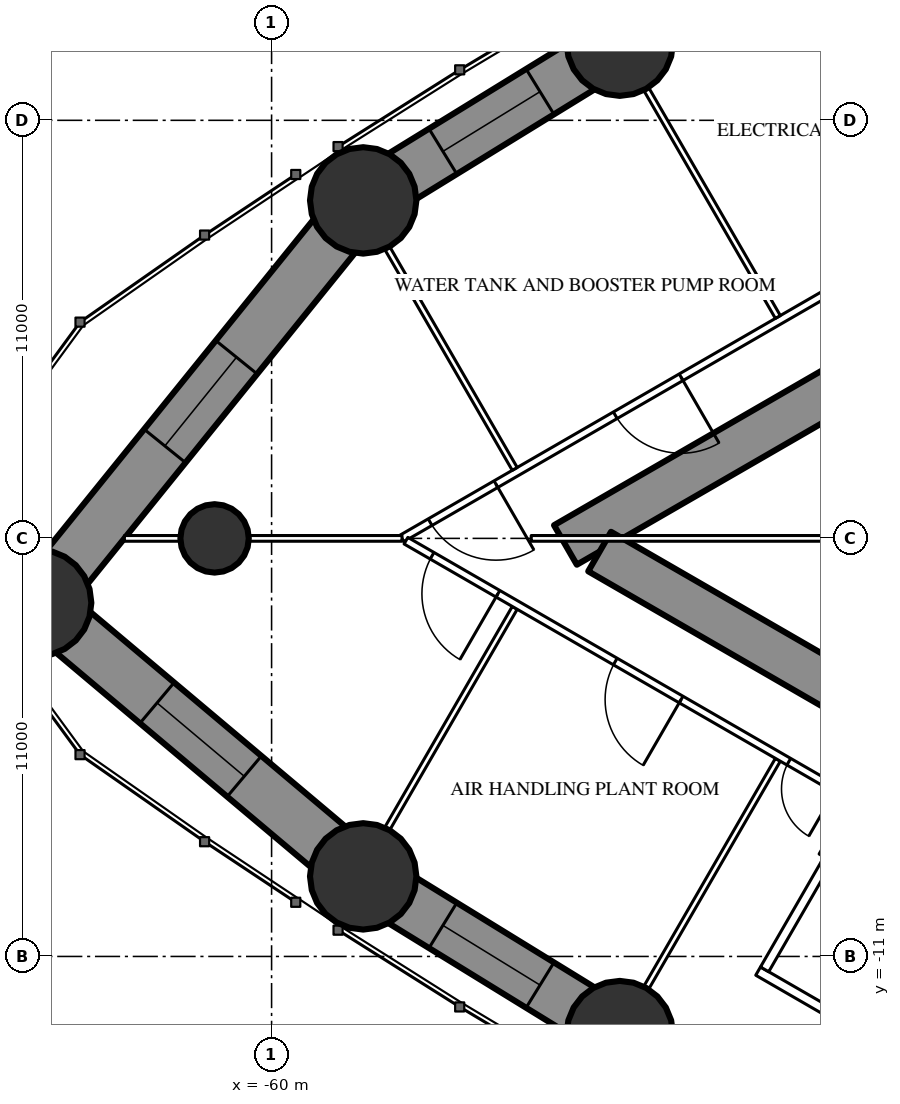
"""IFC4 building model, lengths in metres.
Left out: names, types, materials, properties, quantities, classifications, styles, units other than length and angle.
Written with IfcOpenShell. Run it as: python <this file> out.ifc"""

import sys

from ifc_helpers import new_model, si_unit, direction, frame, frame_2d, origin, origin_2d, place, context, subcontext, project, spatial, rectangle, circle, extrude, element, fill, save


model = new_model("IFC4")
c1 = context("Model", 3, precision=1e-05, world=origin(), true_north=direction((0.0, 1.0)))
c2 = subcontext(c1, "Body", "Model", "MODEL_VIEW")
j1 = project(units=[si_unit("LENGTHUNIT", "METRE"), si_unit("PLANEANGLEUNIT", "RADIAN")], contexts=[c1])
p1 = place(None, origin())
s1 = spatial("IfcSite", under=j1, at=p1, CompositionType="ELEMENT")
p2 = place(p1, origin())
s2 = spatial("IfcBuilding", under=s1, at=p2, CompositionType="ELEMENT")
p3 = place(p2, frame((0.0, 0.0, 201.8)))
s3 = spatial("IfcBuildingStorey", under=s2, at=p3, CompositionType="ELEMENT", Elevation=201.8)
for number, where, z_axis, x_axis in (
    (1, (-66.143, -1.695, 0.0), (0.0, 0.0, 1.0), (1.0, 0.0, 0.0)),
    (2, (-57.59, -8.893, 0.0), (0.0, 0.0, 1.0), (1.0, 0.0, 0.0)),
    (3, (-50.839, -13.043, 0.0), (0.0, 0.0, 1.0), (1.0, 0.0, 0.0)),
    (4, (-50.839, 13.043, 0.0), (0.0, 0.0, 1.0), (1.0, 0.0, 0.0)),
    (5, (-57.59, 8.893, 0.0), (0.0, 0.0, 1.0), (1.0, 0.0, 0.0)),
):
    element("IfcColumn", number, at=place(p3, frame(where, z_axis=z_axis, x_axis=x_axis)), inside=s3, PredefinedType="COLUMN", context=c2, shape_type="SweptSolid", body=[
        extrude(circle(Radius=1.4, at=origin_2d()), origin(), (0.0, 0.0, 1.0), 3.5),
    ])
p4 = place(p3, frame((-61.5, 0.0, 0.0), z_axis=(0.0, 0.0, 1.0), x_axis=(1.0, 0.0, 0.0)))
e6 = element("IfcColumn", 6, at=p4, inside=s3, PredefinedType="COLUMN", context=c2, shape_type="SweptSolid", body=[
    extrude(circle(Radius=0.9, at=origin_2d()), origin(), (0.0, 0.0, 1.0), 3.5),
])
p5 = place(p3, frame((-27.2, 14.3, 0.0), z_axis=(0.0, 0.0, 1.0), x_axis=(-0.866026593062, -0.499997940104, 0.0)))
e7 = element("IfcWall", 7, at=p5, inside=s3, PredefinedType="SHEAR", context=c2, shape_type="SweptSolid", body=[
    extrude(rectangle(XDim=28.946, YDim=1.2, at=frame_2d((14.473, 0.0))), origin(), (0.0, 0.0, 1.0), 3.5),
])
p6 = place(p5, frame((6.5, 0.0, 0.0)))
e8 = element("IfcOpeningElement", 8, at=p6, cuts=e7, PredefinedType="OPENING", context=c2, shape_type="SweptSolid", body=[
    extrude(rectangle(XDim=1.0, YDim=2.2, at=frame_2d((0.5, 1.1))), frame((0.0, 0.61, 0.0), z_axis=(0.0, -1.0, 0.0), x_axis=(1.0, 0.0, 0.0)), (0.0, 0.0, 1.0), 1.22),
])
p7 = place(p5, frame((13.395, 0.0, 0.0)))
e9 = element("IfcOpeningElement", 9, at=p7, cuts=e7, PredefinedType="OPENING", context=c2, shape_type="SweptSolid", body=[
    extrude(rectangle(XDim=1.8, YDim=2.03, at=frame_2d((0.9, 1.015))), frame((0.0, 0.61, 0.0), z_axis=(0.0, -1.0, 0.0), x_axis=(1.0, 0.0, 0.0)), (0.0, 0.0, 1.0), 1.22),
])
p8 = place(p3, frame((-27.2, -14.3, 0.0), z_axis=(0.0, 0.0, 1.0), x_axis=(-0.866024021859, 0.500002393557, 0.0)))
e10 = element("IfcWall", 10, at=p8, inside=s3, PredefinedType="SHEAR", context=c2, shape_type="SweptSolid", body=[
    extrude(rectangle(XDim=27.907, YDim=1.2, at=frame_2d((13.954, 0.0))), origin(), (0.0, 0.0, 1.0), 3.5),
])
p9 = place(p8, frame((6.5, 0.0, 0.0)))
e11 = element("IfcOpeningElement", 11, at=p9, cuts=e10, PredefinedType="OPENING", context=c2, shape_type="SweptSolid", body=[
    extrude(rectangle(XDim=1.0, YDim=2.2, at=frame_2d((0.5, 1.1))), frame((0.0, 0.61, 0.0), z_axis=(0.0, -1.0, 0.0), x_axis=(1.0, 0.0, 0.0)), (0.0, 0.0, 1.0), 1.22),
])
p10 = place(p8, frame((13.829, 0.0, 0.0)))
e12 = element("IfcOpeningElement", 12, at=p10, cuts=e10, PredefinedType="OPENING", context=c2, shape_type="SweptSolid", body=[
    extrude(rectangle(XDim=1.8, YDim=2.2, at=frame_2d((0.9, 1.1))), frame((0.0, 0.61, 0.0), z_axis=(0.0, -1.0, 0.0), x_axis=(1.0, 0.0, 0.0)), (0.0, 0.0, 1.0), 1.22),
])
p11 = place(p3, frame((-43.9, 16.871, 0.0), z_axis=(0.0, 0.0, 1.0), x_axis=(-0.875577684027, -0.483077342911, 0.0)))
e13 = element("IfcWall", 13, at=p11, inside=s3, PredefinedType="SHEAR", context=c2, shape_type="SweptSolid", body=[
    extrude(rectangle(XDim=7.925, YDim=1.4, at=frame_2d((3.962, 0.0))), origin(), (0.0, 0.0, 1.0), 3.5),
])
p12 = place(p11, frame((2.462, 0.0, 0.6)))
e14 = element("IfcOpeningElement", 14, at=p12, cuts=e13, PredefinedType="OPENING", context=c2, shape_type="SweptSolid", body=[
    extrude(rectangle(XDim=3.0, YDim=1.2, at=frame_2d((1.5, 0.6))), frame((0.0, 0.71, 0.0), z_axis=(0.0, -1.0, 0.0), x_axis=(1.0, 0.0, 0.0)), (0.0, 0.0, 1.0), 1.42),
])
p13 = place(p3, frame((-50.839, 13.043, 0.0), z_axis=(0.0, 0.0, 1.0), x_axis=(-0.851892008043, -0.523717487423, 0.0)))
e15 = element("IfcWall", 15, at=p13, inside=s3, PredefinedType="SHEAR", context=c2, shape_type="SweptSolid", body=[
    extrude(rectangle(XDim=7.924, YDim=1.4, at=frame_2d((3.962, 0.0))), origin(), (0.0, 0.0, 1.0), 3.5),
])
p14 = place(p13, frame((2.462, 0.0, 0.6)))
e16 = element("IfcOpeningElement", 16, at=p14, cuts=e15, PredefinedType="OPENING", context=c2, shape_type="SweptSolid", body=[
    extrude(rectangle(XDim=3.0, YDim=1.2, at=frame_2d((1.5, 0.6))), frame((0.0, 0.71, 0.0), z_axis=(0.0, -1.0, 0.0), x_axis=(1.0, 0.0, 0.0)), (0.0, 0.0, 1.0), 1.42),
])
p15 = place(p3, frame((-57.59, 8.893, 0.0), z_axis=(0.0, 0.0, 1.0), x_axis=(-0.628373846765, -0.777911504416, 0.0)))
e17 = element("IfcWall", 17, at=p15, inside=s3, PredefinedType="SHEAR", context=c2, shape_type="SweptSolid", body=[
    extrude(rectangle(XDim=13.611, YDim=1.4, at=frame_2d((6.806, 0.0))), origin(), (0.0, 0.0, 1.0), 3.5),
])
p16 = place(p15, frame((5.306, 0.0, 0.6)))
e18 = element("IfcOpeningElement", 18, at=p16, cuts=e17, PredefinedType="OPENING", context=c2, shape_type="SweptSolid", body=[
    extrude(rectangle(XDim=3.0, YDim=1.2, at=frame_2d((1.5, 0.6))), frame((0.0, 0.71, 0.0), z_axis=(0.0, -1.0, 0.0), x_axis=(1.0, 0.0, 0.0)), (0.0, 0.0, 1.0), 1.42),
])
p17 = place(p3, frame((-66.143, -1.695, 0.0), z_axis=(0.0, 0.0, 1.0), x_axis=(0.765120708367, -0.64388687021, 0.0)))
e19 = element("IfcWall", 19, at=p17, inside=s3, PredefinedType="SHEAR", context=c2, shape_type="SweptSolid", body=[
    extrude(rectangle(XDim=11.179, YDim=1.4, at=frame_2d((5.589, 0.0))), origin(), (0.0, 0.0, 1.0), 3.5),
])
p18 = place(p17, frame((4.089, 0.0, 0.6)))
e20 = element("IfcOpeningElement", 20, at=p18, cuts=e19, PredefinedType="OPENING", context=c2, shape_type="SweptSolid", body=[
    extrude(rectangle(XDim=3.0, YDim=1.2, at=frame_2d((1.5, 0.6))), frame((0.0, 0.71, 0.0), z_axis=(0.0, -1.0, 0.0), x_axis=(1.0, 0.0, 0.0)), (0.0, 0.0, 1.0), 1.42),
])
p19 = place(p3, frame((-57.59, -8.893, 0.0), z_axis=(0.0, 0.0, 1.0), x_axis=(0.851892008043, -0.523717487423, 0.0)))
e21 = element("IfcWall", 21, at=p19, inside=s3, PredefinedType="SHEAR", context=c2, shape_type="SweptSolid", body=[
    extrude(rectangle(XDim=7.924, YDim=1.4, at=frame_2d((3.962, 0.0))), origin(), (0.0, 0.0, 1.0), 3.5),
])
p20 = place(p19, frame((2.462, 0.0, 0.6)))
e22 = element("IfcOpeningElement", 22, at=p20, cuts=e21, PredefinedType="OPENING", context=c2, shape_type="SweptSolid", body=[
    extrude(rectangle(XDim=3.0, YDim=1.2, at=frame_2d((1.5, 0.6))), frame((0.0, 0.71, 0.0), z_axis=(0.0, -1.0, 0.0), x_axis=(1.0, 0.0, 0.0)), (0.0, 0.0, 1.0), 1.42),
])
p21 = place(p3, frame((-50.839, -13.043, 0.0), z_axis=(0.0, 0.0, 1.0), x_axis=(0.875577684027, -0.483077342911, 0.0)))
e23 = element("IfcWall", 23, at=p21, inside=s3, PredefinedType="SHEAR", context=c2, shape_type="SweptSolid", body=[
    extrude(rectangle(XDim=7.925, YDim=1.4, at=frame_2d((3.962, 0.0))), origin(), (0.0, 0.0, 1.0), 3.5),
])
p22 = place(p21, frame((2.462, 0.0, 0.6)))
e24 = element("IfcOpeningElement", 24, at=p22, cuts=e23, PredefinedType="OPENING", context=c2, shape_type="SweptSolid", body=[
    extrude(rectangle(XDim=3.0, YDim=1.2, at=frame_2d((1.5, 0.6))), frame((0.0, 0.71, 0.0), z_axis=(0.0, -1.0, 0.0), x_axis=(1.0, 0.0, 0.0)), (0.0, 0.0, 1.0), 1.42),
])
p23 = place(p3, frame((-27.803, 16.608, 0.0), z_axis=(0.0, 0.0, 1.0), x_axis=(-0.866025851808, -0.499999223999, 0.0)))
e25 = element("IfcWall", 25, at=p23, inside=s3, PredefinedType="PARTITIONING", context=c2, shape_type="SweptSolid", body=[
    extrude(rectangle(XDim=33.215, YDim=0.2, at=frame_2d((16.608, 0.0))), origin(), (0.0, 0.0, 1.0), 3.25),
])
p24 = place(p23, frame((5.584, 0.0, 0.0)))
e26 = element("IfcOpeningElement", 26, at=p24, cuts=e25, PredefinedType="OPENING", context=c2, shape_type="SweptSolid", body=[
    extrude(rectangle(XDim=2.0, YDim=2.4, at=frame_2d((1.0, 1.2))), frame((0.0, 0.11, 0.0), z_axis=(0.0, -1.0, 0.0), x_axis=(1.0, 0.0, 0.0)), (0.0, 0.0, 1.0), 0.22),
])
p25 = place(p23, frame((17.04, 0.0, 0.0)))
e27 = element("IfcOpeningElement", 27, at=p25, cuts=e25, PredefinedType="OPENING", context=c2, shape_type="SweptSolid", body=[
    extrude(rectangle(XDim=2.0, YDim=2.4, at=frame_2d((1.0, 1.2))), frame((0.0, 0.11, 0.0), z_axis=(0.0, -1.0, 0.0), x_axis=(1.0, 0.0, 0.0)), (0.0, 0.0, 1.0), 0.22),
])
p26 = place(p23, frame((24.735, 0.0, 0.0)))
e28 = element("IfcOpeningElement", 28, at=p26, cuts=e25, PredefinedType="OPENING", context=c2, shape_type="SweptSolid", body=[
    extrude(rectangle(XDim=2.0, YDim=2.4, at=frame_2d((1.0, 1.2))), frame((0.0, 0.11, 0.0), z_axis=(0.0, -1.0, 0.0), x_axis=(1.0, 0.0, 0.0)), (0.0, 0.0, 1.0), 0.22),
])
p27 = place(p23, frame((30.361, 0.0, 0.0)))
e29 = element("IfcOpeningElement", 29, at=p27, cuts=e25, PredefinedType="OPENING", context=c2, shape_type="SweptSolid", body=[
    extrude(rectangle(XDim=2.0, YDim=2.03, at=frame_2d((1.0, 1.015))), frame((0.0, 0.11, 0.0), z_axis=(0.0, -1.0, 0.0), x_axis=(1.0, 0.0, 0.0)), (0.0, 0.0, 1.0), 0.22),
])
p28 = place(p3, frame((-46.679, 5.825, 0.0), z_axis=(0.0, 0.0, 1.0), x_axis=(-0.500006839597, 0.866021454905, 0.0)))
e30 = element("IfcWall", 30, at=p28, inside=s3, PredefinedType="PARTITIONING", context=c2, shape_type="SweptSolid", body=[
    extrude(rectangle(XDim=6.911, YDim=0.15, at=frame_2d((3.456, 0.0))), origin(), (0.0, 0.0, 1.0), 2.05),
])
p29 = place(p3, frame((-53.602, 1.828, 0.0), z_axis=(0.0, 0.0, 1.0), x_axis=(-0.49999191814, 0.866030069798, 0.0)))
e31 = element("IfcWall", 31, at=p29, inside=s3, PredefinedType="PARTITIONING", context=c2, shape_type="SweptSolid", body=[
    extrude(rectangle(XDim=6.692, YDim=0.15, at=frame_2d((3.346, 0.0))), origin(), (0.0, 0.0, 1.0), 2.05),
])
p30 = place(p3, frame((-46.679, -5.825, 0.0), z_axis=(0.0, 0.0, 1.0), x_axis=(-0.500006839597, -0.866021454905, 0.0)))
e32 = element("IfcWall", 32, at=p30, inside=s3, PredefinedType="PARTITIONING", context=c2, shape_type="SweptSolid", body=[
    extrude(rectangle(XDim=6.911, YDim=0.15, at=frame_2d((3.456, 0.0))), origin(), (0.0, 0.0, 1.0), 2.05),
])
p31 = place(p3, frame((-53.602, -1.828, 0.0), z_axis=(0.0, 0.0, 1.0), x_axis=(-0.49999191814, -0.866030069798, 0.0)))
e33 = element("IfcWall", 33, at=p31, inside=s3, PredefinedType="PARTITIONING", context=c2, shape_type="SweptSolid", body=[
    extrude(rectangle(XDim=6.692, YDim=0.15, at=frame_2d((3.346, 0.0))), origin(), (0.0, 0.0, 1.0), 2.05),
])
p32 = place(p3, frame((-56.568, 0.0, 0.0), z_axis=(0.0, 0.0, 1.0), x_axis=(-1.0, 0.0, 0.0)))
e34 = element("IfcWall", 34, at=p32, inside=s3, PredefinedType="PARTITIONING", context=c2, shape_type="SweptSolid", body=[
    extrude(rectangle(XDim=7.305, YDim=0.15, at=frame_2d((3.652, 0.0))), origin(), (0.0, 0.0, 1.0), 2.05),
])
p33 = place(p3, frame((-44.715, -6.844, 0.0), z_axis=(0.0, 0.0, 1.0), x_axis=(-0.866025261224, 0.500000246922, 0.0)))
e35 = element("IfcWall", 35, at=p33, inside=s3, PredefinedType="PARTITIONING", context=c2, shape_type="SweptSolid", body=[
    extrude(rectangle(XDim=13.567, YDim=0.2, at=frame_2d((6.783, 0.0))), origin(), (0.0, 0.0, 1.0), 3.25),
])
p34 = place(p33, frame((10.773, 0.0, 0.0)))
e36 = element("IfcOpeningElement", 36, at=p34, cuts=e35, PredefinedType="OPENING", context=c2, shape_type="SweptSolid", body=[
    extrude(rectangle(XDim=2.0, YDim=2.03, at=frame_2d((1.0, 1.015))), frame((0.0, 0.11, 0.0), z_axis=(0.0, -1.0, 0.0), x_axis=(1.0, 0.0, 0.0)), (0.0, 0.0, 1.0), 0.22),
])
p35 = place(p33, frame((5.207, 0.0, 0.0)))
e37 = element("IfcOpeningElement", 37, at=p35, cuts=e35, PredefinedType="OPENING", context=c2, shape_type="SweptSolid", body=[
    extrude(rectangle(XDim=2.0, YDim=2.4, at=frame_2d((1.0, 1.2))), frame((0.0, 0.11, 0.0), z_axis=(0.0, -1.0, 0.0), x_axis=(1.0, 0.0, 0.0)), (0.0, 0.0, 1.0), 0.22),
])
p36 = place(p33, frame((0.5, 0.0, 0.0)))
e38 = element("IfcOpeningElement", 38, at=p36, cuts=e35, PredefinedType="OPENING", context=c2, shape_type="SweptSolid", body=[
    extrude(rectangle(XDim=1.435, YDim=2.03, at=frame_2d((0.718, 1.015))), frame((0.0, 0.11, 0.0), z_axis=(0.0, -1.0, 0.0), x_axis=(1.0, 0.0, 0.0)), (0.0, 0.0, 1.0), 0.22),
])
p37 = place(p3, frame((-44.626, -6.779, 0.0), z_axis=(0.0, 0.0, 1.0), x_axis=(-0.500022947832, -0.866012154442, 0.0)))
e39 = element("IfcWall", 39, at=p37, inside=s3, PredefinedType="PARTITIONING", context=c2, shape_type="SweptSolid", body=[
    extrude(rectangle(XDim=1.805, YDim=0.15, at=frame_2d((0.903, 0.0))), origin(), (0.0, 0.0, 1.0), 3.25),
])
p38 = place(p3, frame((-44.575, 0.0, 0.0), z_axis=(0.0, 0.0, 1.0), x_axis=(-1.0, 0.0, 0.0)))
e40 = element("IfcWall", 40, at=p38, inside=s3, PredefinedType="PARTITIONING", context=c2, shape_type="SweptSolid", body=[
    extrude(rectangle(XDim=8.593, YDim=0.15, at=frame_2d((4.297, 0.0))), origin(), (0.0, 0.0, 1.0), 2.05),
])
p39 = place(p3, frame((-41.482, -14.686, 0.0), z_axis=(0.0, 0.0, 1.0), x_axis=(-0.86603344179, 0.499986077507, 0.0)))
e41 = element("IfcWall", 41, at=p39, inside=s3, PredefinedType="PARTITIONING", context=c2, shape_type="SweptSolid", body=[
    extrude(rectangle(XDim=6.6, YDim=0.25, at=frame_2d((3.3, 0.0))), origin(), (0.0, 0.0, 1.0), 3.25),
])
p40 = place(p3, frame((-45.428, -8.568, 0.0), z_axis=(0.0, 0.0, 1.0), x_axis=(-0.499929347863, -0.866066190972, 0.0)))
e42 = element("IfcWall", 42, at=p40, inside=s3, PredefinedType="PARTITIONING", context=c2, shape_type="SweptSolid", body=[
    extrude(rectangle(XDim=3.201, YDim=0.25, at=frame_2d((1.6, 0.0))), origin(), (0.0, 0.0, 1.0), 3.25),
])
p41 = place(p14, origin())
e43 = element("IfcWindow", 43, at=p41, inside=s3, PartitioningType="SINGLE_PANEL", PredefinedType="WINDOW", context=c2, shape_type="SweptSolid", body=[
    extrude(rectangle(XDim=3.0, YDim=1.2, at=frame_2d((1.5, 0.6))), frame((0.0, 0.03, 0.0), z_axis=(0.0, -1.0, 0.0), x_axis=(1.0, 0.0, 0.0)), (0.0, 0.0, 1.0), 0.06),
])
fill(e16, e43)
p42 = place(p16, origin())
e44 = element("IfcWindow", 44, at=p42, inside=s3, PartitioningType="SINGLE_PANEL", PredefinedType="WINDOW", context=c2, shape_type="SweptSolid", body=[
    extrude(rectangle(XDim=3.0, YDim=1.2, at=frame_2d((1.5, 0.6))), frame((0.0, 0.03, 0.0), z_axis=(0.0, -1.0, 0.0), x_axis=(1.0, 0.0, 0.0)), (0.0, 0.0, 1.0), 0.06),
])
fill(e18, e44)
p43 = place(p18, origin())
e45 = element("IfcWindow", 45, at=p43, inside=s3, PartitioningType="SINGLE_PANEL", PredefinedType="WINDOW", context=c2, shape_type="SweptSolid", body=[
    extrude(rectangle(XDim=3.0, YDim=1.2, at=frame_2d((1.5, 0.6))), frame((0.0, 0.03, 0.0), z_axis=(0.0, -1.0, 0.0), x_axis=(1.0, 0.0, 0.0)), (0.0, 0.0, 1.0), 0.06),
])
fill(e20, e45)
p44 = place(p20, origin())
e46 = element("IfcWindow", 46, at=p44, inside=s3, PartitioningType="SINGLE_PANEL", PredefinedType="WINDOW", context=c2, shape_type="SweptSolid", body=[
    extrude(rectangle(XDim=3.0, YDim=1.2, at=frame_2d((1.5, 0.6))), frame((0.0, 0.03, 0.0), z_axis=(0.0, -1.0, 0.0), x_axis=(1.0, 0.0, 0.0)), (0.0, 0.0, 1.0), 0.06),
])
fill(e22, e46)
p45 = place(p26, origin())
e47 = element("IfcDoor", 47, at=p45, inside=s3, OperationType="DOUBLE_DOOR_SINGLE_SWING", PredefinedType="DOOR", context=c2, shape_type="SweptSolid", body=[
    extrude(rectangle(XDim=2.0, YDim=2.4, at=frame_2d((1.0, 1.2))), frame((0.0, 0.025, 0.0), z_axis=(0.0, -1.0, 0.0), x_axis=(1.0, 0.0, 0.0)), (0.0, 0.0, 1.0), 0.05),
])
fill(e28, e47)
p46 = place(p27, origin())
e48 = element("IfcDoor", 48, at=p46, inside=s3, OperationType="DOUBLE_DOOR_SINGLE_SWING", PredefinedType="DOOR", context=c2, shape_type="SweptSolid", body=[
    extrude(rectangle(XDim=2.0, YDim=2.03, at=frame_2d((1.0, 1.015))), frame((0.0, 0.025, 0.0), z_axis=(0.0, -1.0, 0.0), x_axis=(1.0, 0.0, 0.0)), (0.0, 0.0, 1.0), 0.05),
])
fill(e29, e48)
p47 = place(p34, origin())
e49 = element("IfcDoor", 49, at=p47, inside=s3, OperationType="DOUBLE_DOOR_SINGLE_SWING", PredefinedType="DOOR", context=c2, shape_type="SweptSolid", body=[
    extrude(rectangle(XDim=2.0, YDim=2.03, at=frame_2d((1.0, 1.015))), frame((0.0, 0.025, 0.0), z_axis=(0.0, -1.0, 0.0), x_axis=(1.0, 0.0, 0.0)), (0.0, 0.0, 1.0), 0.05),
])
fill(e36, e49)
p48 = place(p35, origin())
e50 = element("IfcDoor", 50, at=p48, inside=s3, OperationType="DOUBLE_DOOR_SINGLE_SWING", PredefinedType="DOOR", context=c2, shape_type="SweptSolid", body=[
    extrude(rectangle(XDim=2.0, YDim=2.4, at=frame_2d((1.0, 1.2))), frame((0.0, 0.025, 0.0), z_axis=(0.0, -1.0, 0.0), x_axis=(1.0, 0.0, 0.0)), (0.0, 0.0, 1.0), 0.05),
])
fill(e37, e50)
p49 = place(p36, origin())
e51 = element("IfcDoor", 51, at=p49, inside=s3, OperationType="SINGLE_SWING_LEFT", PredefinedType="DOOR", context=c2, shape_type="SweptSolid", body=[
    extrude(rectangle(XDim=1.435, YDim=2.03, at=frame_2d((0.718, 1.015))), frame((0.0, 0.025, 0.0), z_axis=(0.0, -1.0, 0.0), x_axis=(1.0, 0.0, 0.0)), (0.0, 0.0, 1.0), 0.05),
])
fill(e38, e51)
save(model, sys.argv[1])
